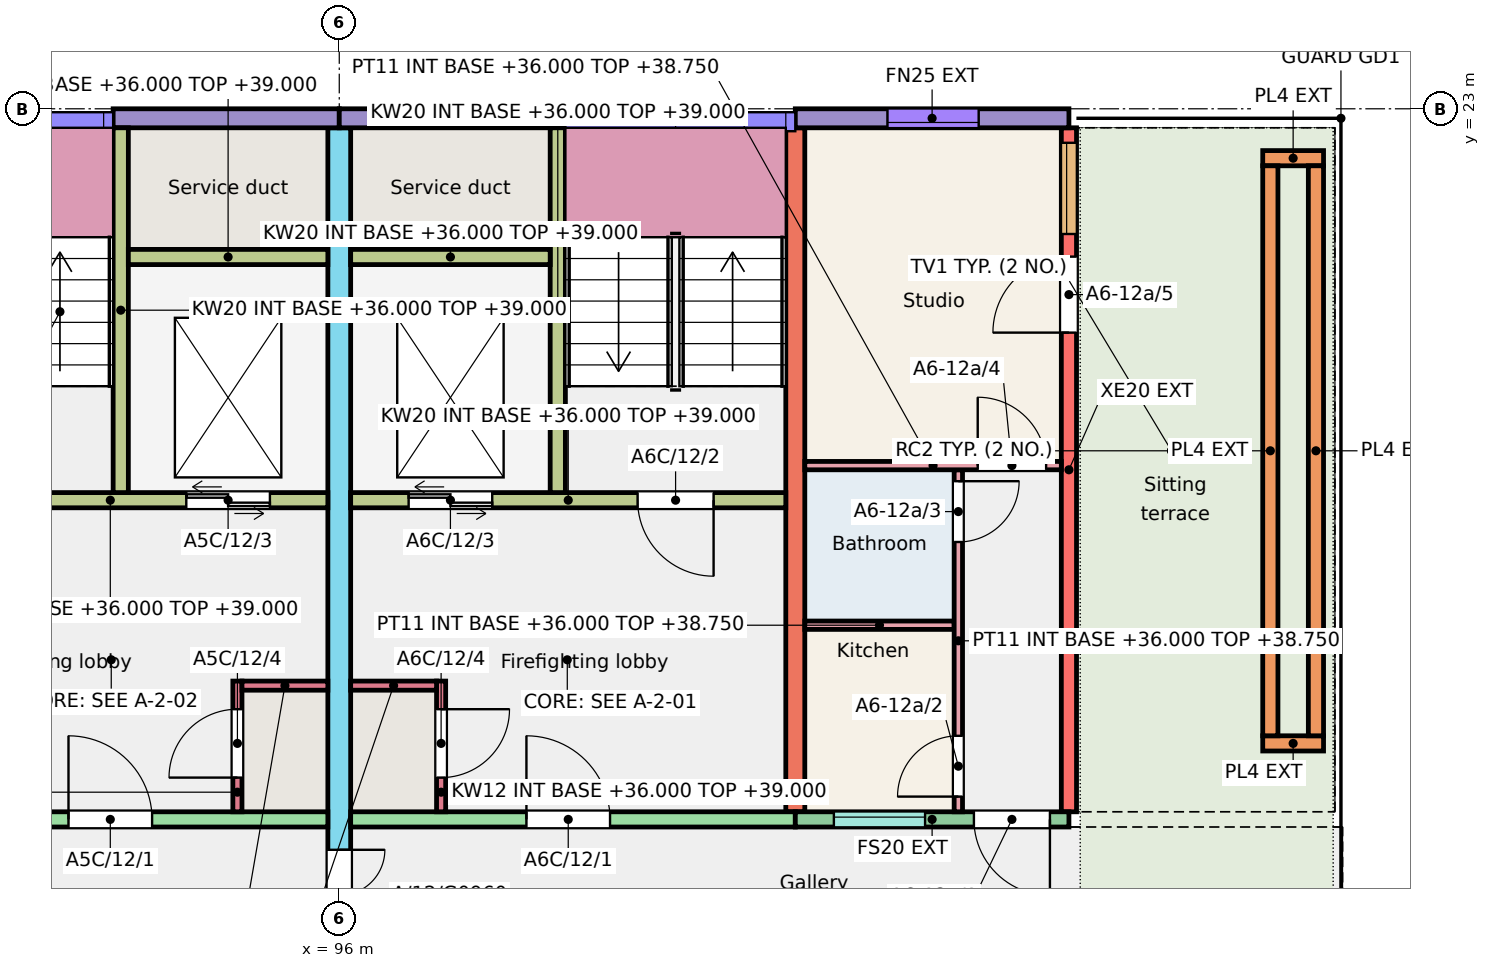
"""IFC4 building model, lengths in metres.
Left out: names, types, materials, properties, quantities, classifications, styles, units other than length and angle.
Written with IfcOpenShell. Run it as: python <this file> out.ifc"""

import sys

from ifc_helpers import new_model, si_unit, direction, frame, frame_2d, origin, place, context, subcontext, project, spatial, rectangle, extrude, element, fill, save


model = new_model("IFC4")
c1 = context("Model", 3, precision=1e-05, world=origin(), true_north=direction((0.0, 1.0)))
c2 = subcontext(c1, "Body", "Model", "MODEL_VIEW")
j1 = project(units=[si_unit("LENGTHUNIT", "METRE"), si_unit("PLANEANGLEUNIT", "RADIAN")], contexts=[c1])
p1 = place(None, origin())
s1 = spatial("IfcSite", under=j1, at=p1, CompositionType="ELEMENT")
p2 = place(p1, origin())
s2 = spatial("IfcBuilding", under=s1, at=p2, CompositionType="ELEMENT")
p3 = place(p2, frame((0.0, 0.0, 36.0)))
s3 = spatial("IfcBuildingStorey", under=s2, at=p3, CompositionType="ELEMENT", Elevation=36.0)
p4 = place(p3, frame((96.0, 11.75, 0.0), z_axis=(0.0, 0.0, 1.0), x_axis=(0.0, 1.0, 0.0)))
e1 = element("IfcWall", 1, at=p4, inside=s3, PredefinedType="SHEAR", context=c2, shape_type="SweptSolid", body=[
    extrude(rectangle(XDim=11.0, YDim=0.3, at=frame_2d((5.5, 0.0))), origin(), (0.0, 0.0, 1.0), 3.0),
])
p5 = place(p4, frame((0.3, 0.0, 0.0)))
e2 = element("IfcOpeningElement", 2, at=p5, cuts=e1, PredefinedType="OPENING", context=c2, shape_type="SweptSolid", body=[
    extrude(rectangle(XDim=1.2, YDim=2.1, at=frame_2d((0.6, 1.05))), frame((0.0, 0.16, 0.0), z_axis=(0.0, -1.0, 0.0), x_axis=(1.0, 0.0, 0.0)), (0.0, 0.0, 1.0), 0.32),
])
p6 = place(p3, frame((102.0, 13.75, 0.0), z_axis=(0.0, 0.0, 1.0), x_axis=(0.0, 1.0, 0.0)))
e3 = element("IfcWall", 3, at=p6, inside=s3, PredefinedType="SHEAR", context=c2, shape_type="SweptSolid", body=[
    extrude(rectangle(XDim=9.0, YDim=0.25, at=frame_2d((4.5, 0.0))), origin(), (0.0, 0.0, 1.0), 3.0),
])
p7 = place(p3, frame((105.6, 13.75, 0.0), z_axis=(0.0, 0.0, 1.0), x_axis=(0.0, 1.0, 0.0)))
e4 = element("IfcWall", 4, at=p7, inside=s3, PredefinedType="SHEAR", context=c2, shape_type="SweptSolid", body=[
    extrude(rectangle(XDim=9.0, YDim=0.2, at=frame_2d((4.5, 0.0))), origin(), (0.0, 0.0, 1.0), 3.0),
])
p8 = place(p7, frame((7.603, 0.0, 0.9)))
e5 = element("IfcOpeningElement", 5, at=p8, cuts=e4, PredefinedType="OPENING", context=c2, shape_type="SweptSolid", body=[
    extrude(rectangle(XDim=1.2, YDim=1.5, at=frame_2d((0.6, 0.75))), frame((0.0, 0.11, 0.0), z_axis=(0.0, -1.0, 0.0), x_axis=(1.0, 0.0, 0.0)), (0.0, 0.0, 1.0), 0.22),
])
p9 = place(p7, frame((6.305, 0.0, 0.0)))
e6 = element("IfcOpeningElement", 6, at=p9, cuts=e4, PredefinedType="OPENING", context=c2, shape_type="SweptSolid", body=[
    extrude(rectangle(XDim=1.0, YDim=2.1, at=frame_2d((0.5, 1.05))), frame((0.0, 0.11, 0.0), z_axis=(0.0, -1.0, 0.0), x_axis=(1.0, 0.0, 0.0)), (0.0, 0.0, 1.0), 0.22),
])
p10 = place(p3, frame((93.025, 22.875, 0.0), z_axis=(0.0, 0.0, 1.0), x_axis=(1.0, 0.0, 0.0)))
e7 = element("IfcWall", 7, at=p10, inside=s3, PredefinedType="SOLIDWALL", context=c2, shape_type="SweptSolid", body=[
    extrude(rectangle(XDim=2.975, YDim=0.25, at=frame_2d((1.488, 0.0))), origin(), (0.0, 0.0, 1.0), 3.0),
])
p11 = place(p3, frame((90.0, 13.65, 0.0), z_axis=(0.0, 0.0, 1.0), x_axis=(1.0, 0.0, 0.0)))
e8 = element("IfcWall", 8, at=p11, inside=s3, PredefinedType="SHEAR", context=c2, shape_type="SweptSolid", body=[
    extrude(rectangle(XDim=5.85, YDim=0.2, at=frame_2d((2.925, 0.0))), origin(), (0.0, 0.0, 1.0), 3.0),
])
p12 = place(p11, frame((2.438, 0.0, 0.0)))
e9 = element("IfcOpeningElement", 9, at=p12, cuts=e8, PredefinedType="OPENING", context=c2, shape_type="SweptSolid", body=[
    extrude(rectangle(XDim=1.1, YDim=2.1, at=frame_2d((0.55, 1.05))), frame((0.0, 0.11, 0.0), z_axis=(0.0, -1.0, 0.0), x_axis=(1.0, 0.0, 0.0)), (0.0, 0.0, 1.0), 0.22),
])
p13 = place(p3, frame((90.125, 17.85, 0.0), z_axis=(0.0, 0.0, 1.0), x_axis=(1.0, 0.0, 0.0)))
e10 = element("IfcWall", 10, at=p13, inside=s3, PredefinedType="SHEAR", context=c2, shape_type="SweptSolid", body=[
    extrude(rectangle(XDim=5.725, YDim=0.2, at=frame_2d((2.863, 0.0))), origin(), (0.0, 0.0, 1.0), 3.0),
])
p14 = place(p13, frame((0.95, 0.0, 0.0)))
e11 = element("IfcOpeningElement", 11, at=p14, cuts=e10, PredefinedType="OPENING", context=c2, shape_type="SweptSolid", body=[
    extrude(rectangle(XDim=1.0, YDim=2.1, at=frame_2d((0.5, 1.05))), frame((0.0, 0.11, 0.0), z_axis=(0.0, -1.0, 0.0), x_axis=(1.0, 0.0, 0.0)), (0.0, 0.0, 1.0), 0.22),
])
p15 = place(p13, frame((3.863, 0.0, 0.0)))
e12 = element("IfcOpeningElement", 12, at=p15, cuts=e10, PredefinedType="OPENING", context=c2, shape_type="SweptSolid", body=[
    extrude(rectangle(XDim=1.1, YDim=2.1, at=frame_2d((0.55, 1.05))), frame((0.0, 0.11, 0.0), z_axis=(0.0, -1.0, 0.0), x_axis=(1.0, 0.0, 0.0)), (0.0, 0.0, 1.0), 0.22),
])
p16 = place(p3, frame((93.125, 17.95, 0.0), z_axis=(0.0, 0.0, 1.0), x_axis=(0.0, 1.0, 0.0)))
e13 = element("IfcWall", 13, at=p16, inside=s3, PredefinedType="SHEAR", context=c2, shape_type="SweptSolid", body=[
    extrude(rectangle(XDim=4.8, YDim=0.2, at=frame_2d((2.4, 0.0))), origin(), (0.0, 0.0, 1.0), 3.0),
])
p17 = place(p3, frame((93.225, 21.05, 0.0), z_axis=(0.0, 0.0, 1.0), x_axis=(1.0, 0.0, 0.0)))
e14 = element("IfcWall", 14, at=p17, inside=s3, PredefinedType="SHEAR", context=c2, shape_type="SweptSolid", body=[
    extrude(rectangle(XDim=2.625, YDim=0.2, at=frame_2d((1.312, 0.0))), origin(), (0.0, 0.0, 1.0), 3.0),
])
p18 = place(p3, frame((94.66, 13.75, 0.0), z_axis=(0.0, 0.0, 1.0), x_axis=(0.0, 1.0, 0.0)))
e15 = element("IfcWall", 15, at=p18, inside=s3, PredefinedType="SHEAR", context=c2, shape_type="SweptSolid", body=[
    extrude(rectangle(XDim=1.72, YDim=0.12, at=frame_2d((0.86, 0.0))), origin(), (0.0, 0.0, 1.0), 3.0),
])
p19 = place(p18, frame((0.45, 0.0, 0.0)))
e16 = element("IfcOpeningElement", 16, at=p19, cuts=e15, PredefinedType="OPENING", context=c2, shape_type="SweptSolid", body=[
    extrude(rectangle(XDim=0.9, YDim=2.1, at=frame_2d((0.45, 1.05))), frame((0.0, 0.07, 0.0), z_axis=(0.0, -1.0, 0.0), x_axis=(1.0, 0.0, 0.0)), (0.0, 0.0, 1.0), 0.14),
])
p20 = place(p3, frame((94.72, 15.41, 0.0), z_axis=(0.0, 0.0, 1.0), x_axis=(1.0, 0.0, 0.0)))
e17 = element("IfcWall", 17, at=p20, inside=s3, PredefinedType="SHEAR", context=c2, shape_type="SweptSolid", body=[
    extrude(rectangle(XDim=1.13, YDim=0.12, at=frame_2d((0.565, 0.0))), origin(), (0.0, 0.0, 1.0), 3.0),
])
p21 = place(p3, frame((96.0, 22.875, 0.0), z_axis=(0.0, 0.0, 1.0), x_axis=(1.0, 0.0, 0.0)))
e18 = element("IfcWall", 18, at=p21, inside=s3, PredefinedType="SOLIDWALL", context=c2, shape_type="SweptSolid", body=[
    extrude(rectangle(XDim=2.975, YDim=0.25, at=frame_2d((1.488, 0.0))), origin(), (0.0, 0.0, 1.0), 3.0),
])
p22 = place(p3, frame((96.15, 13.65, 0.0), z_axis=(0.0, 0.0, 1.0), x_axis=(1.0, 0.0, 0.0)))
e19 = element("IfcWall", 19, at=p22, inside=s3, PredefinedType="SHEAR", context=c2, shape_type="SweptSolid", body=[
    extrude(rectangle(XDim=5.85, YDim=0.2, at=frame_2d((2.925, 0.0))), origin(), (0.0, 0.0, 1.0), 3.0),
])
p23 = place(p22, frame((2.312, 0.0, 0.0)))
e20 = element("IfcOpeningElement", 20, at=p23, cuts=e19, PredefinedType="OPENING", context=c2, shape_type="SweptSolid", body=[
    extrude(rectangle(XDim=1.1, YDim=2.1, at=frame_2d((0.55, 1.05))), frame((0.0, 0.11, 0.0), z_axis=(0.0, -1.0, 0.0), x_axis=(1.0, 0.0, 0.0)), (0.0, 0.0, 1.0), 0.22),
])
p24 = place(p3, frame((96.15, 17.85, 0.0), z_axis=(0.0, 0.0, 1.0), x_axis=(1.0, 0.0, 0.0)))
e21 = element("IfcWall", 21, at=p24, inside=s3, PredefinedType="SHEAR", context=c2, shape_type="SweptSolid", body=[
    extrude(rectangle(XDim=5.725, YDim=0.2, at=frame_2d((2.863, 0.0))), origin(), (0.0, 0.0, 1.0), 3.0),
])
p25 = place(p24, frame((3.775, 0.0, 0.0)))
e22 = element("IfcOpeningElement", 22, at=p25, cuts=e21, PredefinedType="OPENING", context=c2, shape_type="SweptSolid", body=[
    extrude(rectangle(XDim=1.0, YDim=2.1, at=frame_2d((0.5, 1.05))), frame((0.0, 0.11, 0.0), z_axis=(0.0, -1.0, 0.0), x_axis=(1.0, 0.0, 0.0)), (0.0, 0.0, 1.0), 0.22),
])
p26 = place(p24, frame((0.762, 0.0, 0.0)))
e23 = element("IfcOpeningElement", 23, at=p26, cuts=e21, PredefinedType="OPENING", context=c2, shape_type="SweptSolid", body=[
    extrude(rectangle(XDim=1.1, YDim=2.1, at=frame_2d((0.55, 1.05))), frame((0.0, 0.11, 0.0), z_axis=(0.0, -1.0, 0.0), x_axis=(1.0, 0.0, 0.0)), (0.0, 0.0, 1.0), 0.22),
])
p27 = place(p3, frame((98.875, 17.95, 0.0), z_axis=(0.0, 0.0, 1.0), x_axis=(0.0, 1.0, 0.0)))
e24 = element("IfcWall", 24, at=p27, inside=s3, PredefinedType="SHEAR", context=c2, shape_type="SweptSolid", body=[
    extrude(rectangle(XDim=4.8, YDim=0.2, at=frame_2d((2.4, 0.0))), origin(), (0.0, 0.0, 1.0), 3.0),
])
p28 = place(p3, frame((96.15, 21.05, 0.0), z_axis=(0.0, 0.0, 1.0), x_axis=(1.0, 0.0, 0.0)))
e25 = element("IfcWall", 25, at=p28, inside=s3, PredefinedType="SHEAR", context=c2, shape_type="SweptSolid", body=[
    extrude(rectangle(XDim=2.625, YDim=0.2, at=frame_2d((1.312, 0.0))), origin(), (0.0, 0.0, 1.0), 3.0),
])
p29 = place(p3, frame((97.34, 13.75, 0.0), z_axis=(0.0, 0.0, 1.0), x_axis=(0.0, 1.0, 0.0)))
e26 = element("IfcWall", 26, at=p29, inside=s3, PredefinedType="SHEAR", context=c2, shape_type="SweptSolid", body=[
    extrude(rectangle(XDim=1.72, YDim=0.12, at=frame_2d((0.86, 0.0))), origin(), (0.0, 0.0, 1.0), 3.0),
])
p30 = place(p29, frame((0.45, 0.0, 0.0)))
e27 = element("IfcOpeningElement", 27, at=p30, cuts=e26, PredefinedType="OPENING", context=c2, shape_type="SweptSolid", body=[
    extrude(rectangle(XDim=0.9, YDim=2.1, at=frame_2d((0.45, 1.05))), frame((0.0, 0.07, 0.0), z_axis=(0.0, -1.0, 0.0), x_axis=(1.0, 0.0, 0.0)), (0.0, 0.0, 1.0), 0.14),
])
p31 = place(p3, frame((96.15, 15.41, 0.0), z_axis=(0.0, 0.0, 1.0), x_axis=(1.0, 0.0, 0.0)))
e28 = element("IfcWall", 28, at=p31, inside=s3, PredefinedType="SHEAR", context=c2, shape_type="SweptSolid", body=[
    extrude(rectangle(XDim=1.13, YDim=0.12, at=frame_2d((0.565, 0.0))), origin(), (0.0, 0.0, 1.0), 3.0),
])
p32 = place(p3, frame((102.0, 22.875, 0.0), z_axis=(0.0, 0.0, 1.0), x_axis=(1.0, 0.0, 0.0)))
e29 = element("IfcWall", 29, at=p32, inside=s3, PredefinedType="SOLIDWALL", context=c2, shape_type="SweptSolid", body=[
    extrude(rectangle(XDim=3.6, YDim=0.25, at=frame_2d((1.8, 0.0))), origin(), (0.0, 0.0, 1.0), 3.0),
])
p33 = place(p32, frame((1.212, 0.0, 0.8)))
e30 = element("IfcOpeningElement", 30, at=p33, cuts=e29, PredefinedType="OPENING", context=c2, shape_type="SweptSolid", body=[
    extrude(rectangle(XDim=1.2, YDim=1.6, at=frame_2d((0.6, 0.8))), frame((0.0, 0.135, 0.0), z_axis=(0.0, -1.0, 0.0), x_axis=(1.0, 0.0, 0.0)), (0.0, 0.0, 1.0), 0.27),
])
p34 = place(p3, frame((102.0, 13.65, 0.0), z_axis=(0.0, 0.0, 1.0), x_axis=(1.0, 0.0, 0.0)))
e31 = element("IfcWall", 31, at=p34, inside=s3, PredefinedType="SOLIDWALL", context=c2, shape_type="SweptSolid", body=[
    extrude(rectangle(XDim=3.6, YDim=0.2, at=frame_2d((1.8, 0.0))), origin(), (0.0, 0.0, 1.0), 3.0),
])
p35 = place(p34, frame((0.508, 0.0, 1.1)))
e32 = element("IfcOpeningElement", 32, at=p35, cuts=e31, PredefinedType="OPENING", context=c2, shape_type="SweptSolid", body=[
    extrude(rectangle(XDim=1.2, YDim=1.3, at=frame_2d((0.6, 0.65))), frame((0.0, 0.11, 0.0), z_axis=(0.0, -1.0, 0.0), x_axis=(1.0, 0.0, 0.0)), (0.0, 0.0, 1.0), 0.22),
])
p36 = place(p34, frame((2.35, 0.0, 0.0)))
e33 = element("IfcOpeningElement", 33, at=p36, cuts=e31, PredefinedType="OPENING", context=c2, shape_type="SweptSolid", body=[
    extrude(rectangle(XDim=1.0, YDim=2.1, at=frame_2d((0.5, 1.05))), frame((0.0, 0.11, 0.0), z_axis=(0.0, -1.0, 0.0), x_axis=(1.0, 0.0, 0.0)), (0.0, 0.0, 1.0), 0.22),
])
for number, where, z_axis, x_axis in (
    (34, (108.15, 14.65, 0.01), (0.0, 0.0, 1.0), (1.0, 0.0, 0.0)),
    (35, (108.15, 22.35, 0.01), (0.0, 0.0, 1.0), (1.0, 0.0, 0.0)),
):
    element("IfcWall", number, at=place(p3, frame(where, z_axis=z_axis, x_axis=x_axis)), inside=s3, PredefinedType="SOLIDWALL", context=c2, shape_type="SweptSolid", body=[
        extrude(rectangle(XDim=0.8, YDim=0.2, at=frame_2d((0.4, 0.0))), origin(), (0.0, 0.0, 1.0), 0.45),
    ])
for number, where, z_axis, x_axis in (
    (36, (108.25, 14.75, 0.01), (0.0, 0.0, 1.0), (0.0, 1.0, 0.0)),
    (37, (108.85, 14.75, 0.01), (0.0, 0.0, 1.0), (0.0, 1.0, 0.0)),
):
    element("IfcWall", number, at=place(p3, frame(where, z_axis=z_axis, x_axis=x_axis)), inside=s3, PredefinedType="SOLIDWALL", context=c2, shape_type="SweptSolid", body=[
        extrude(rectangle(XDim=7.5, YDim=0.2, at=frame_2d((3.75, 0.0))), origin(), (0.0, 0.0, 1.0), 0.45),
    ])
p37 = place(p3, frame((102.125, 16.205, 0.0), z_axis=(0.0, 0.0, 1.0), x_axis=(1.0, 0.0, 0.0)))
e38 = element("IfcWall", 38, at=p37, inside=s3, PredefinedType="PARTITIONING", context=c2, shape_type="SweptSolid", body=[
    extrude(rectangle(XDim=1.965, YDim=0.11, at=frame_2d((0.982, 0.0))), origin(), (0.0, 0.0, 1.0), 2.75),
])
p38 = place(p3, frame((104.145, 13.75, 0.0), z_axis=(0.0, 0.0, 1.0), x_axis=(0.0, 1.0, 0.0)))
e39 = element("IfcWall", 39, at=p38, inside=s3, PredefinedType="PARTITIONING", context=c2, shape_type="SweptSolid", body=[
    extrude(rectangle(XDim=4.5, YDim=0.11, at=frame_2d((2.25, 0.0))), origin(), (0.0, 0.0, 1.0), 2.75),
])
p39 = place(p38, frame((0.2, 0.0, 0.0)))
e40 = element("IfcOpeningElement", 40, at=p39, cuts=e39, PredefinedType="OPENING", context=c2, shape_type="SweptSolid", body=[
    extrude(rectangle(XDim=0.8, YDim=2.1, at=frame_2d((0.4, 1.05))), frame((0.0, 0.065, 0.0), z_axis=(0.0, -1.0, 0.0), x_axis=(1.0, 0.0, 0.0)), (0.0, 0.0, 1.0), 0.13),
])
p40 = place(p38, frame((3.55, 0.0, 0.0)))
e41 = element("IfcOpeningElement", 41, at=p40, cuts=e39, PredefinedType="OPENING", context=c2, shape_type="SweptSolid", body=[
    extrude(rectangle(XDim=0.8, YDim=2.1, at=frame_2d((0.4, 1.05))), frame((0.0, 0.065, 0.0), z_axis=(0.0, -1.0, 0.0), x_axis=(1.0, 0.0, 0.0)), (0.0, 0.0, 1.0), 0.13),
])
p41 = place(p3, frame((102.125, 18.305, 0.0), z_axis=(0.0, 0.0, 1.0), x_axis=(1.0, 0.0, 0.0)))
e42 = element("IfcWall", 42, at=p41, inside=s3, PredefinedType="PARTITIONING", context=c2, shape_type="SweptSolid", body=[
    extrude(rectangle(XDim=3.375, YDim=0.11, at=frame_2d((1.688, 0.0))), origin(), (0.0, 0.0, 1.0), 2.75),
])
p42 = place(p41, frame((2.275, 0.0, 0.0)))
e43 = element("IfcOpeningElement", 43, at=p42, cuts=e42, PredefinedType="OPENING", context=c2, shape_type="SweptSolid", body=[
    extrude(rectangle(XDim=0.9, YDim=2.1, at=frame_2d((0.45, 1.05))), frame((0.0, 0.065, 0.0), z_axis=(0.0, -1.0, 0.0), x_axis=(1.0, 0.0, 0.0)), (0.0, 0.0, 1.0), 0.13),
])
p43 = place(p35, origin())
e44 = element("IfcWindow", 44, at=p43, inside=s3, PartitioningType="SINGLE_PANEL", PredefinedType="WINDOW", context=c2, shape_type="SweptSolid", body=[
    extrude(rectangle(XDim=1.2, YDim=1.3, at=frame_2d((0.6, 0.65))), frame((0.0, 0.06, 0.0), z_axis=(0.0, -1.0, 0.0), x_axis=(1.0, 0.0, 0.0)), (0.0, 0.0, 1.0), 0.06),
])
fill(e32, e44)
p44 = place(p33, origin())
e45 = element("IfcWindow", 45, at=p44, inside=s3, PartitioningType="SINGLE_PANEL", PredefinedType="WINDOW", context=c2, shape_type="SweptSolid", body=[
    extrude(rectangle(XDim=1.2, YDim=1.6, at=frame_2d((0.6, 0.8))), frame((0.0, -0.025, 0.0), z_axis=(0.0, -1.0, 0.0), x_axis=(1.0, 0.0, 0.0)), (0.0, 0.0, 1.0), 0.06),
])
fill(e30, e45)
p45 = place(p8, origin())
e46 = element("IfcWindow", 46, at=p45, inside=s3, PartitioningType="SINGLE_PANEL", PredefinedType="WINDOW", context=c2, shape_type="SweptSolid", body=[
    extrude(rectangle(XDim=1.2, YDim=1.5, at=frame_2d((0.6, 0.75))), frame((0.0, 0.06, 0.0), z_axis=(0.0, -1.0, 0.0), x_axis=(1.0, 0.0, 0.0)), (0.0, 0.0, 1.0), 0.06),
])
fill(e5, e46)
p46 = place(p36, origin())
e47 = element("IfcDoor", 47, at=p46, inside=s3, OperationType="SINGLE_SWING_RIGHT", PredefinedType="DOOR", context=c2, shape_type="SweptSolid", body=[
    extrude(rectangle(XDim=1.0, YDim=2.1, at=frame_2d((0.5, 1.05))), frame((0.0, 0.025, 0.0), z_axis=(0.0, -1.0, 0.0), x_axis=(1.0, 0.0, 0.0)), (0.0, 0.0, 1.0), 0.05),
])
fill(e33, e47)
p47 = place(p39, origin())
e48 = element("IfcDoor", 48, at=p47, inside=s3, OperationType="SINGLE_SWING_LEFT", PredefinedType="DOOR", context=c2, shape_type="SweptSolid", body=[
    extrude(rectangle(XDim=0.8, YDim=2.1, at=frame_2d((0.4, 1.05))), frame((0.0, 0.025, 0.0), z_axis=(0.0, -1.0, 0.0), x_axis=(1.0, 0.0, 0.0)), (0.0, 0.0, 1.0), 0.05),
])
fill(e40, e48)
p48 = place(p40, origin())
e49 = element("IfcDoor", 49, at=p48, inside=s3, OperationType="SINGLE_SWING_RIGHT", PredefinedType="DOOR", context=c2, shape_type="SweptSolid", body=[
    extrude(rectangle(XDim=0.8, YDim=2.1, at=frame_2d((0.4, 1.05))), frame((0.0, 0.025, 0.0), z_axis=(0.0, -1.0, 0.0), x_axis=(1.0, 0.0, 0.0)), (0.0, 0.0, 1.0), 0.05),
])
fill(e41, e49)
p49 = place(p42, origin())
e50 = element("IfcDoor", 50, at=p49, inside=s3, OperationType="SINGLE_SWING_LEFT", PredefinedType="DOOR", context=c2, shape_type="SweptSolid", body=[
    extrude(rectangle(XDim=0.9, YDim=2.1, at=frame_2d((0.45, 1.05))), frame((0.0, 0.025, 0.0), z_axis=(0.0, -1.0, 0.0), x_axis=(1.0, 0.0, 0.0)), (0.0, 0.0, 1.0), 0.05),
])
fill(e43, e50)
p50 = place(p9, origin())
e51 = element("IfcDoor", 51, at=p50, inside=s3, OperationType="SINGLE_SWING_LEFT", PredefinedType="DOOR", context=c2, shape_type="SweptSolid", body=[
    extrude(rectangle(XDim=1.0, YDim=2.1, at=frame_2d((0.5, 1.05))), frame((0.0, 0.025, 0.0), z_axis=(0.0, -1.0, 0.0), x_axis=(1.0, 0.0, 0.0)), (0.0, 0.0, 1.0), 0.05),
])
fill(e6, e51)
p51 = place(p12, origin())
e52 = element("IfcDoor", 52, at=p51, inside=s3, OperationType="SINGLE_SWING_LEFT", PredefinedType="DOOR", context=c2, shape_type="SweptSolid", body=[
    extrude(rectangle(XDim=1.1, YDim=2.1, at=frame_2d((0.55, 1.05))), frame((0.0, 0.025, 0.0), z_axis=(0.0, -1.0, 0.0), x_axis=(1.0, 0.0, 0.0)), (0.0, 0.0, 1.0), 0.05),
])
fill(e9, e52)
p52 = place(p15, origin())
e53 = element("IfcDoor", 53, at=p52, inside=s3, OperationType="DOUBLE_DOOR_SLIDING", PredefinedType="DOOR", context=c2, shape_type="SweptSolid", body=[
    extrude(rectangle(XDim=1.1, YDim=2.1, at=frame_2d((0.55, 1.05))), frame((0.0, 0.025, 0.0), z_axis=(0.0, -1.0, 0.0), x_axis=(1.0, 0.0, 0.0)), (0.0, 0.0, 1.0), 0.05),
])
fill(e12, e53)
p53 = place(p19, origin())
e54 = element("IfcDoor", 54, at=p53, inside=s3, OperationType="SINGLE_SWING_LEFT", PredefinedType="DOOR", context=c2, shape_type="SweptSolid", body=[
    extrude(rectangle(XDim=0.9, YDim=2.1, at=frame_2d((0.45, 1.05))), frame((0.0, 0.025, 0.0), z_axis=(0.0, -1.0, 0.0), x_axis=(1.0, 0.0, 0.0)), (0.0, 0.0, 1.0), 0.05),
])
fill(e16, e54)
p54 = place(p23, origin())
e55 = element("IfcDoor", 55, at=p54, inside=s3, OperationType="SINGLE_SWING_LEFT", PredefinedType="DOOR", context=c2, shape_type="SweptSolid", body=[
    extrude(rectangle(XDim=1.1, YDim=2.1, at=frame_2d((0.55, 1.05))), frame((0.0, 0.025, 0.0), z_axis=(0.0, -1.0, 0.0), x_axis=(1.0, 0.0, 0.0)), (0.0, 0.0, 1.0), 0.05),
])
fill(e20, e55)
p55 = place(p25, origin())
e56 = element("IfcDoor", 56, at=p55, inside=s3, OperationType="SINGLE_SWING_RIGHT", PredefinedType="DOOR", context=c2, shape_type="SweptSolid", body=[
    extrude(rectangle(XDim=1.0, YDim=2.1, at=frame_2d((0.5, 1.05))), frame((0.0, 0.025, 0.0), z_axis=(0.0, -1.0, 0.0), x_axis=(1.0, 0.0, 0.0)), (0.0, 0.0, 1.0), 0.05),
])
fill(e22, e56)
p56 = place(p26, origin())
e57 = element("IfcDoor", 57, at=p56, inside=s3, OperationType="DOUBLE_DOOR_SLIDING", PredefinedType="DOOR", context=c2, shape_type="SweptSolid", body=[
    extrude(rectangle(XDim=1.1, YDim=2.1, at=frame_2d((0.55, 1.05))), frame((0.0, 0.025, 0.0), z_axis=(0.0, -1.0, 0.0), x_axis=(1.0, 0.0, 0.0)), (0.0, 0.0, 1.0), 0.05),
])
fill(e23, e57)
p57 = place(p30, origin())
e58 = element("IfcDoor", 58, at=p57, inside=s3, OperationType="SINGLE_SWING_RIGHT", PredefinedType="DOOR", context=c2, shape_type="SweptSolid", body=[
    extrude(rectangle(XDim=0.9, YDim=2.1, at=frame_2d((0.45, 1.05))), frame((0.0, 0.025, 0.0), z_axis=(0.0, -1.0, 0.0), x_axis=(1.0, 0.0, 0.0)), (0.0, 0.0, 1.0), 0.05),
])
fill(e27, e58)
p58 = place(p5, origin())
e59 = element("IfcDoor", 59, at=p58, inside=s3, OperationType="DOUBLE_DOOR_SINGLE_SWING", PredefinedType="DOOR", context=c2, shape_type="SweptSolid", body=[
    extrude(rectangle(XDim=1.2, YDim=2.1, at=frame_2d((0.6, 1.05))), frame((0.0, 0.025, 0.0), z_axis=(0.0, -1.0, 0.0), x_axis=(1.0, 0.0, 0.0)), (0.0, 0.0, 1.0), 0.05),
])
fill(e2, e59)
save(model, sys.argv[1])
